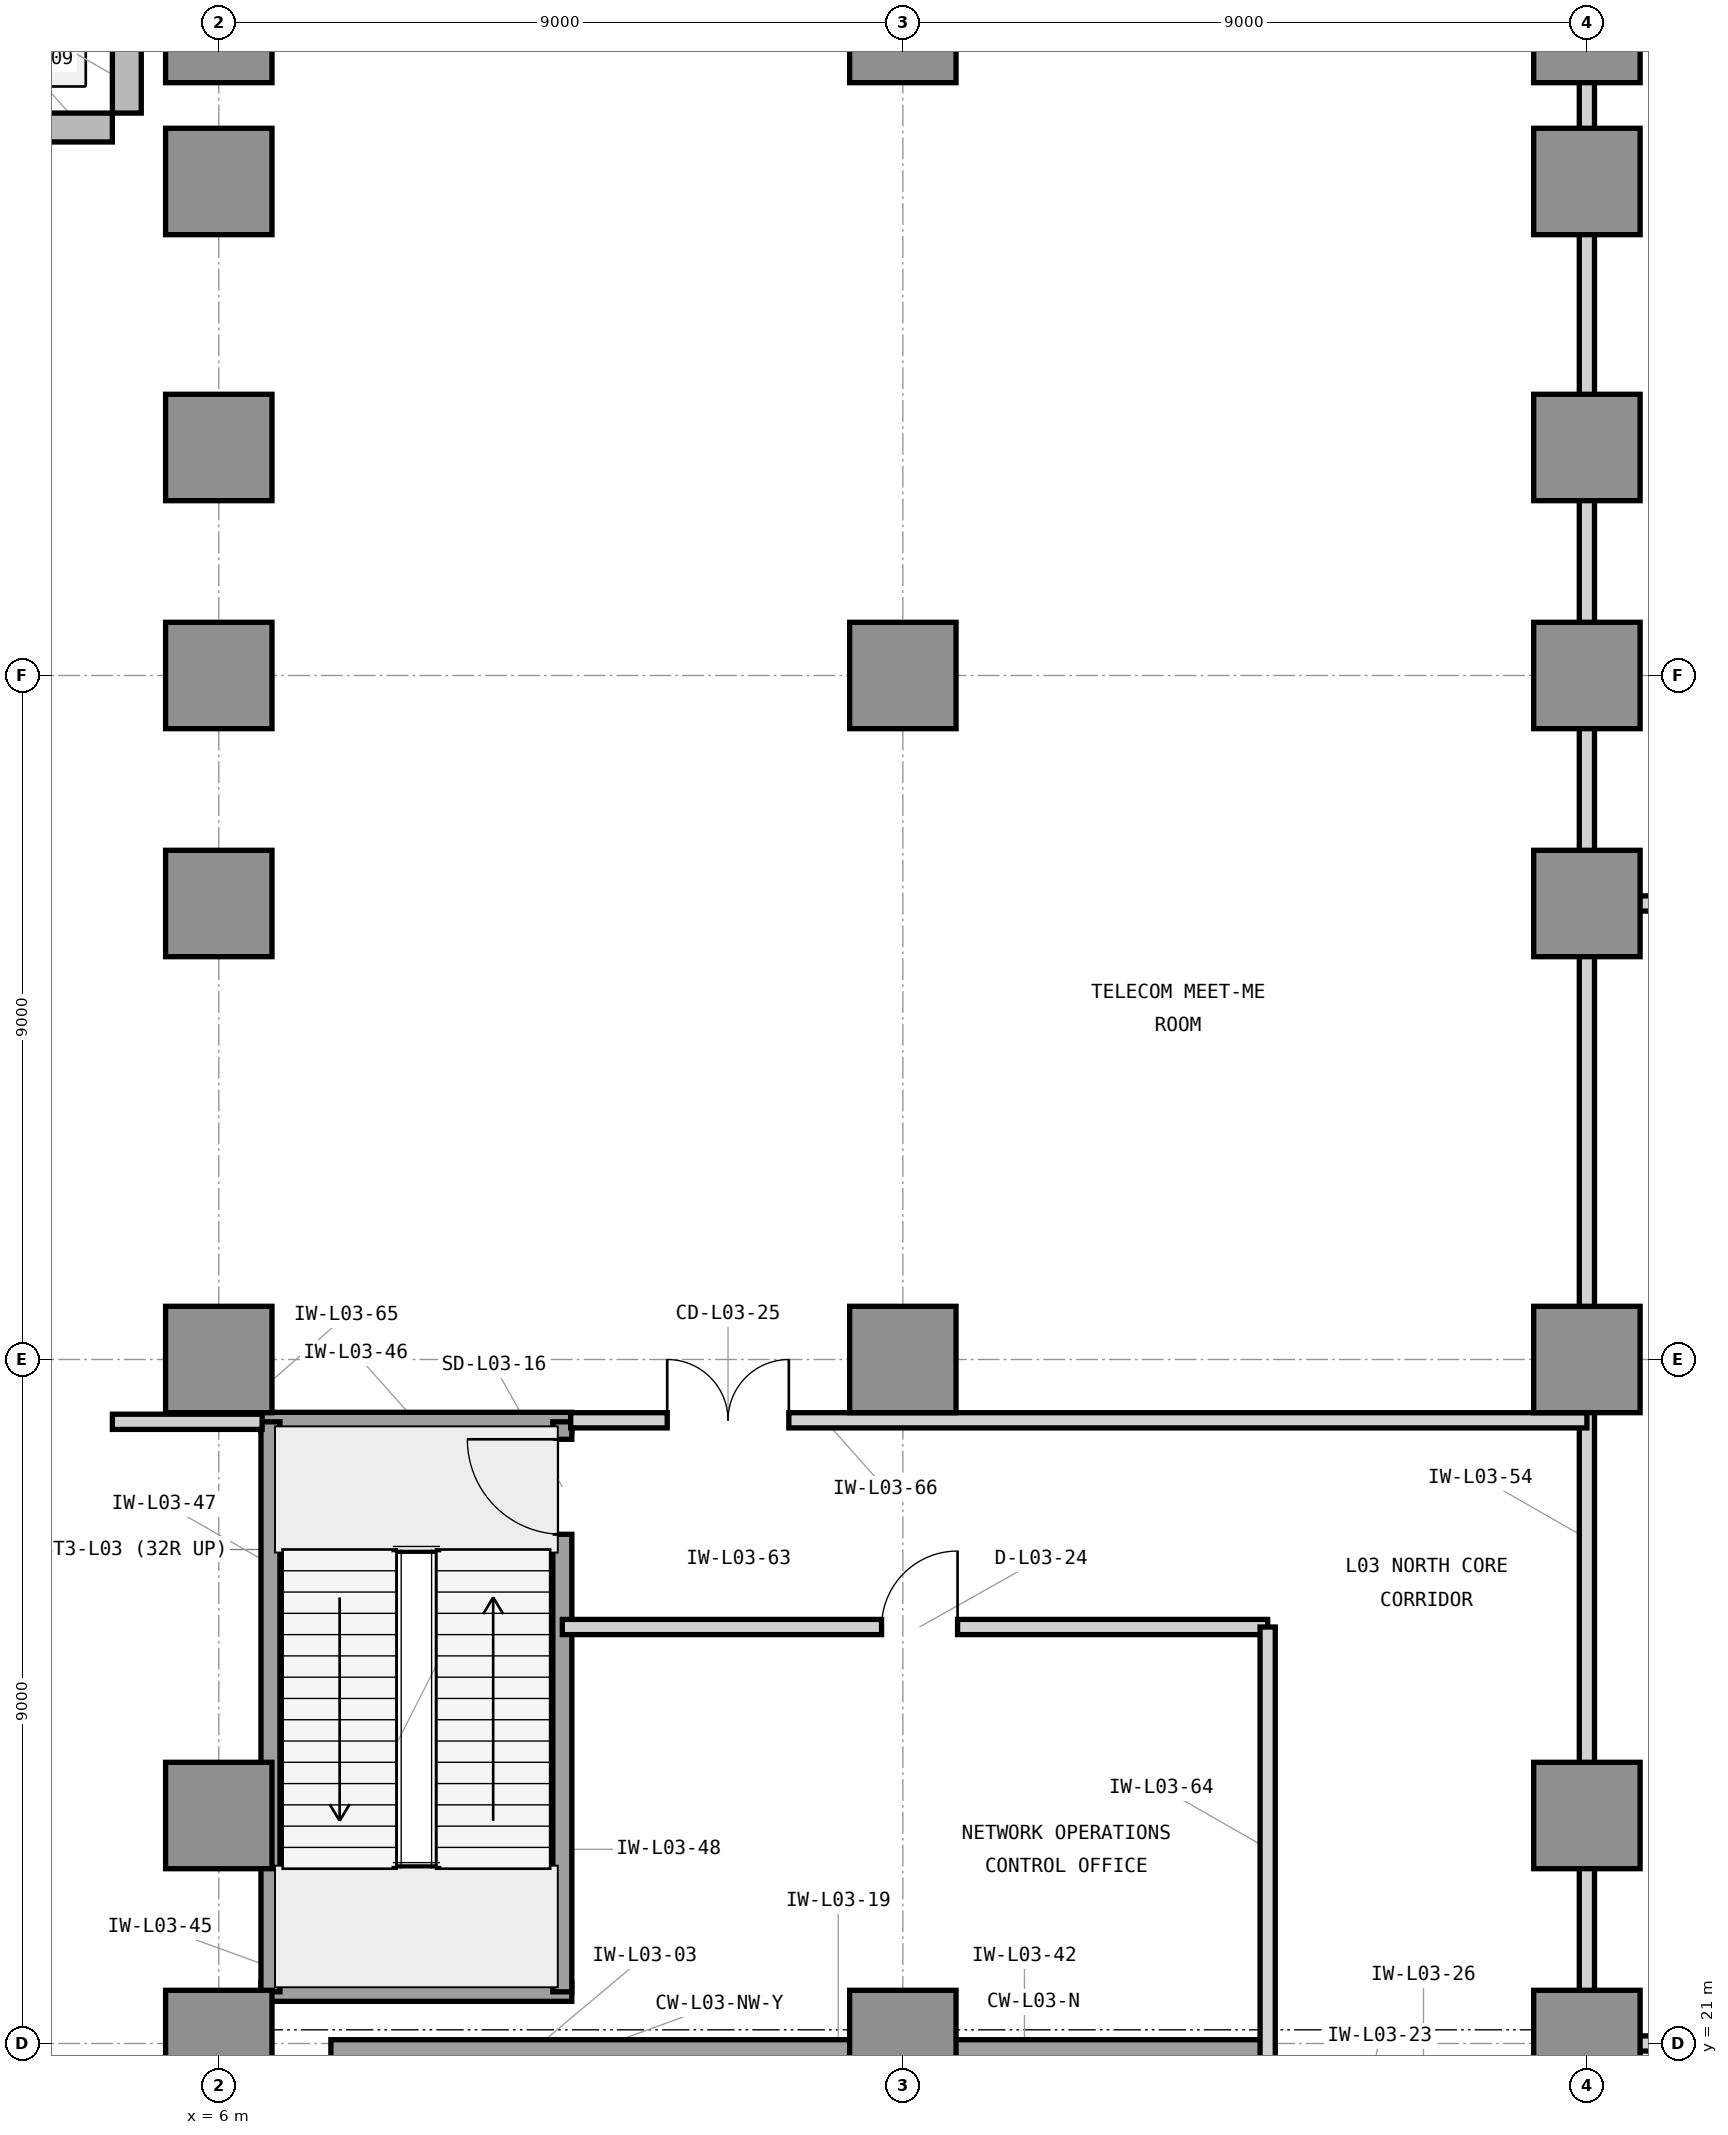
"""IFC4 building model, lengths in metres.
Left out: names, types, materials, properties, quantities, classifications, styles, units other than length and angle.
Written with IfcOpenShell. Run it as: python <this file> out.ifc"""

import sys

from ifc_helpers import new_model, si_unit, direction, frame, frame_2d, origin, origin_2d, place, context, subcontext, project, spatial, rectangle, extrude, element, fill, save


model = new_model("IFC4")
c1 = context("Model", 3, precision=1e-05, world=origin(), true_north=direction((0.0, 1.0)))
c2 = subcontext(c1, "Body", "Model", "MODEL_VIEW")
j1 = project(units=[si_unit("LENGTHUNIT", "METRE"), si_unit("PLANEANGLEUNIT", "RADIAN")], contexts=[c1])
p1 = place(None, origin())
s1 = spatial("IfcSite", under=j1, at=p1, CompositionType="ELEMENT")
p2 = place(p1, origin())
s2 = spatial("IfcBuilding", under=s1, at=p2, CompositionType="ELEMENT")
p3 = place(p2, frame((0.0, 0.0, 16.2)))
s3 = spatial("IfcBuildingStorey", under=s2, at=p3, CompositionType="ELEMENT", Elevation=16.2)
p4 = place(p3, frame((7.475, 20.65, 0.0), z_axis=(0.0, 0.0, 1.0), x_axis=(1.0, 0.0, 0.0)))
e1 = element("IfcWall", 1, at=p4, inside=s3, PredefinedType="SHEAR", context=c2, shape_type="SweptSolid", body=[
    extrude(rectangle(XDim=12.325, YDim=0.8, at=frame_2d((6.163, 0.0))), origin(), (0.0, 0.0, 1.0), 5.4),
])
for number, where, z_axis, x_axis in (
    (2, (6.0, 21.0, -0.6), (0.0, 0.0, 1.0), (1.0, 0.0, 0.0)),
    (3, (6.0, 30.0, -0.6), (0.0, 0.0, 1.0), (1.0, 0.0, 0.0)),
    (4, (6.0, 39.0, -0.6), (0.0, 0.0, 1.0), (1.0, 0.0, 0.0)),
    (5, (6.0, 47.5, -0.6), (0.0, 0.0, 1.0), (1.0, 0.0, 0.0)),
    (6, (15.0, 21.0, -0.6), (0.0, 0.0, 1.0), (1.0, 0.0, 0.0)),
    (7, (15.0, 30.0, -0.6), (0.0, 0.0, 1.0), (1.0, 0.0, 0.0)),
    (8, (15.0, 39.0, -0.6), (0.0, 0.0, 1.0), (1.0, 0.0, 0.0)),
    (9, (15.0, 47.5, -0.6), (0.0, 0.0, 1.0), (1.0, 0.0, 0.0)),
    (10, (24.0, 21.0, -0.6), (0.0, 0.0, 1.0), (1.0, 0.0, 0.0)),
    (11, (24.0, 30.0, -0.6), (0.0, 0.0, 1.0), (1.0, 0.0, 0.0)),
    (12, (24.0, 39.0, -0.6), (0.0, 0.0, 1.0), (1.0, 0.0, 0.0)),
    (13, (24.0, 47.5, -0.6), (0.0, 0.0, 1.0), (1.0, 0.0, 0.0)),
    (14, (6.0, 24.0, -0.6), (0.0, 0.0, 1.0), (1.0, 0.0, 0.0)),
    (15, (24.0, 24.0, -0.6), (0.0, 0.0, 1.0), (1.0, 0.0, 0.0)),
    (16, (6.0, 36.0, -0.6), (0.0, 0.0, 1.0), (1.0, 0.0, 0.0)),
    (17, (24.0, 36.0, -0.6), (0.0, 0.0, 1.0), (1.0, 0.0, 0.0)),
    (18, (6.0, 42.0, -0.6), (0.0, 0.0, 1.0), (1.0, 0.0, 0.0)),
    (19, (24.0, 42.0, -0.6), (0.0, 0.0, 1.0), (1.0, 0.0, 0.0)),
    (20, (6.0, 45.5, -0.6), (0.0, 0.0, 1.0), (1.0, 0.0, 0.0)),
    (21, (24.0, 45.5, -0.6), (0.0, 0.0, 1.0), (1.0, 0.0, 0.0)),
):
    element("IfcColumn", number, at=place(p3, frame(where, z_axis=z_axis, x_axis=x_axis)), inside=s3, PredefinedType="COLUMN", context=c2, shape_type="SweptSolid", body=[
        extrude(rectangle(XDim=1.4, YDim=1.4, at=origin_2d()), origin(), (0.0, 0.0, 1.0), 6.0),
    ])
for number, where, z_axis, x_axis in (
    (22, (4.79, 48.0, 0.0), (0.0, 0.0, 1.0), (0.0, -1.0, 0.0)),
    (23, (4.6, 46.21, 0.0), (0.0, 0.0, 1.0), (-1.0, 0.0, 0.0)),
):
    element("IfcWall", number, at=place(p3, frame(where, z_axis=z_axis, x_axis=x_axis)), inside=s3, PredefinedType="STANDARD", context=c2, shape_type="SweptSolid", body=[
        extrude(rectangle(XDim=1.6, YDim=0.38, at=frame_2d((0.8, 0.0))), origin(), (0.0, 0.0, 1.0), 5.18),
    ])
for number, where, z_axis, x_axis in (
    (24, (6.555, 21.68, 0.0), (0.0, 0.0, 1.0), (1.0, 0.0, 0.0)),
    (25, (6.555, 29.18, 0.0), (0.0, 0.0, 1.0), (1.0, 0.0, 0.0)),
):
    element("IfcWall", number, at=place(p3, frame(where, z_axis=z_axis, x_axis=x_axis)), inside=s3, PredefinedType="SHEAR", context=c2, shape_type="SweptSolid", body=[
        extrude(rectangle(XDim=4.09, YDim=0.25, at=frame_2d((2.045, 0.0))), origin(), (0.0, 0.0, 1.0), 5.4),
    ])
p5 = place(p3, frame((6.68, 21.68, 0.0), z_axis=(0.0, 0.0, 1.0), x_axis=(0.0, 1.0, 0.0)))
e26 = element("IfcWall", 26, at=p5, inside=s3, PredefinedType="SHEAR", context=c2, shape_type="SweptSolid", body=[
    extrude(rectangle(XDim=7.5, YDim=0.25, at=frame_2d((3.75, 0.0))), origin(), (0.0, 0.0, 1.0), 5.4),
])
p6 = place(p3, frame((10.52, 21.68, 0.0), z_axis=(0.0, 0.0, 1.0), x_axis=(0.0, 1.0, 0.0)))
e27 = element("IfcWall", 27, at=p6, inside=s3, PredefinedType="SHEAR", context=c2, shape_type="SweptSolid", body=[
    extrude(rectangle(XDim=7.5, YDim=0.25, at=frame_2d((3.75, 0.0))), origin(), (0.0, 0.0, 1.0), 5.4),
])
p7 = place(p6, frame((6.02, 0.0, 0.0)))
e28 = element("IfcOpeningElement", 28, at=p7, cuts=e27, PredefinedType="OPENING", context=c2, shape_type="SweptSolid", body=[
    extrude(rectangle(XDim=1.25, YDim=2.2, at=frame_2d((0.625, 1.1))), frame((0.0, 0.135, 0.0), z_axis=(0.0, -1.0, 0.0), x_axis=(1.0, 0.0, 0.0)), (0.0, 0.0, 1.0), 0.27),
])
p8 = place(p3, frame((24.0, 21.0, 0.0), z_axis=(0.0, 0.0, 1.0), x_axis=(1.0, 0.0, 0.0)))
e29 = element("IfcWall", 29, at=p8, inside=s3, PredefinedType="PARTITIONING", context=c2, shape_type="SweptSolid", body=[
    extrude(rectangle(XDim=44.79, YDim=0.2, at=frame_2d((22.395, 0.0))), origin(), (0.0, 0.0, 1.0), 4.434),
])
p9 = place(p8, frame((3.5, 0.0, 0.0)))
e30 = element("IfcOpeningElement", 30, at=p9, cuts=e29, PredefinedType="OPENING", context=c2, shape_type="SweptSolid", body=[
    extrude(rectangle(XDim=1.6, YDim=2.3, at=frame_2d((0.8, 1.15))), frame((0.0, 0.11, 0.0), z_axis=(0.0, -1.0, 0.0), x_axis=(1.0, 0.0, 0.0)), (0.0, 0.0, 1.0), 0.22),
])
p10 = place(p8, frame((41.2, 0.0, 0.0)))
e31 = element("IfcOpeningElement", 31, at=p10, cuts=e29, PredefinedType="OPENING", context=c2, shape_type="SweptSolid", body=[
    extrude(rectangle(XDim=1.6, YDim=2.3, at=frame_2d((0.8, 1.15))), frame((0.0, 0.11, 0.0), z_axis=(0.0, -1.0, 0.0), x_axis=(1.0, 0.0, 0.0)), (0.0, 0.0, 1.0), 0.22),
])
p11 = place(p3, frame((24.0, 21.0, 0.0), z_axis=(0.0, 0.0, 1.0), x_axis=(0.0, 1.0, 0.0)))
e32 = element("IfcWall", 32, at=p11, inside=s3, PredefinedType="PARTITIONING", context=c2, shape_type="SweptSolid", body=[
    extrude(rectangle(XDim=26.58, YDim=0.2, at=frame_2d((13.29, 0.0))), origin(), (0.0, 0.0, 1.0), 4.434),
])
p12 = place(p3, frame((24.0, 36.0, 0.0), z_axis=(0.0, 0.0, 1.0), x_axis=(1.0, 0.0, 0.0)))
e33 = element("IfcWall", 33, at=p12, inside=s3, PredefinedType="PARTITIONING", context=c2, shape_type="SweptSolid", body=[
    extrude(rectangle(XDim=29.0, YDim=0.2, at=frame_2d((14.5, 0.0))), origin(), (0.0, 0.0, 1.0), 5.13),
])
p13 = place(p12, frame((12.0, 0.0, 0.0)))
e34 = element("IfcOpeningElement", 34, at=p13, cuts=e33, PredefinedType="OPENING", context=c2, shape_type="SweptSolid", body=[
    extrude(rectangle(XDim=1.6, YDim=2.3, at=frame_2d((0.8, 1.15))), frame((0.0, 0.11, 0.0), z_axis=(0.0, -1.0, 0.0), x_axis=(1.0, 0.0, 0.0)), (0.0, 0.0, 1.0), 0.22),
])
p14 = place(p3, frame((10.52, 26.48, 0.0), z_axis=(0.0, 0.0, 1.0), x_axis=(1.0, 0.0, 0.0)))
e35 = element("IfcWall", 35, at=p14, inside=s3, PredefinedType="PARTITIONING", context=c2, shape_type="SweptSolid", body=[
    extrude(rectangle(XDim=9.28, YDim=0.2, at=frame_2d((4.64, 0.0))), origin(), (0.0, 0.0, 1.0), 5.13),
])
p15 = place(p14, frame((4.2, 0.0, 0.0)))
e36 = element("IfcOpeningElement", 36, at=p15, cuts=e35, PredefinedType="OPENING", context=c2, shape_type="SweptSolid", body=[
    extrude(rectangle(XDim=1.0, YDim=2.15, at=frame_2d((0.5, 1.075))), frame((0.0, 0.11, 0.0), z_axis=(0.0, -1.0, 0.0), x_axis=(1.0, 0.0, 0.0)), (0.0, 0.0, 1.0), 0.22),
])
p16 = place(p3, frame((19.8, 20.65, 0.0), z_axis=(0.0, 0.0, 1.0), x_axis=(0.0, 1.0, 0.0)))
e37 = element("IfcWall", 37, at=p16, inside=s3, PredefinedType="PARTITIONING", context=c2, shape_type="SweptSolid", body=[
    extrude(rectangle(XDim=5.83, YDim=0.2, at=frame_2d((2.915, 0.0))), origin(), (0.0, 0.0, 1.0), 5.13),
])
p17 = place(p3, frame((4.6, 29.18, 0.0), z_axis=(0.0, 0.0, 1.0), x_axis=(1.0, 0.0, 0.0)))
e38 = element("IfcWall", 38, at=p17, inside=s3, PredefinedType="PARTITIONING", context=c2, shape_type="SweptSolid", body=[
    extrude(rectangle(XDim=1.97, YDim=0.2, at=frame_2d((0.985, 0.0))), origin(), (0.0, 0.0, 1.0), 5.13),
])
p18 = place(p3, frame((10.63, 29.2, 0.0), z_axis=(0.0, 0.0, 1.0), x_axis=(1.0, 0.0, 0.0)))
e39 = element("IfcWall", 39, at=p18, inside=s3, PredefinedType="PARTITIONING", context=c2, shape_type="SweptSolid", body=[
    extrude(rectangle(XDim=13.37, YDim=0.2, at=frame_2d((6.685, 0.0))), origin(), (0.0, 0.0, 1.0), 5.13),
])
p19 = place(p18, frame((1.27, 0.0, 0.0)))
e40 = element("IfcOpeningElement", 40, at=p19, cuts=e39, PredefinedType="OPENING", context=c2, shape_type="SweptSolid", body=[
    extrude(rectangle(XDim=1.6, YDim=2.3, at=frame_2d((0.8, 1.15))), frame((0.0, 0.11, 0.0), z_axis=(0.0, -1.0, 0.0), x_axis=(1.0, 0.0, 0.0)), (0.0, 0.0, 1.0), 0.22),
])
p20 = place(p7, origin())
e41 = element("IfcDoor", 41, at=p20, inside=s3, OperationType="SINGLE_SWING_RIGHT", PredefinedType="DOOR", context=c2, shape_type="SweptSolid", body=[
    extrude(rectangle(XDim=1.25, YDim=2.2, at=frame_2d((0.625, 1.1))), frame((0.0, 0.025, 0.0), z_axis=(0.0, -1.0, 0.0), x_axis=(1.0, 0.0, 0.0)), (0.0, 0.0, 1.0), 0.05),
])
fill(e28, e41)
p21 = place(p15, origin())
e42 = element("IfcDoor", 42, at=p21, inside=s3, OperationType="SINGLE_SWING_RIGHT", PredefinedType="DOOR", context=c2, shape_type="SweptSolid", body=[
    extrude(rectangle(XDim=1.0, YDim=2.15, at=frame_2d((0.5, 1.075))), frame((0.0, 0.025, 0.0), z_axis=(0.0, -1.0, 0.0), x_axis=(1.0, 0.0, 0.0)), (0.0, 0.0, 1.0), 0.05),
])
fill(e36, e42)
p22 = place(p19, origin())
e43 = element("IfcDoor", 43, at=p22, inside=s3, OperationType="DOUBLE_DOOR_SINGLE_SWING", PredefinedType="DOOR", context=c2, shape_type="SweptSolid", body=[
    extrude(rectangle(XDim=1.6, YDim=2.3, at=frame_2d((0.8, 1.15))), frame((0.0, 0.025, 0.0), z_axis=(0.0, -1.0, 0.0), x_axis=(1.0, 0.0, 0.0)), (0.0, 0.0, 1.0), 0.05),
])
fill(e40, e43)
save(model, sys.argv[1])
